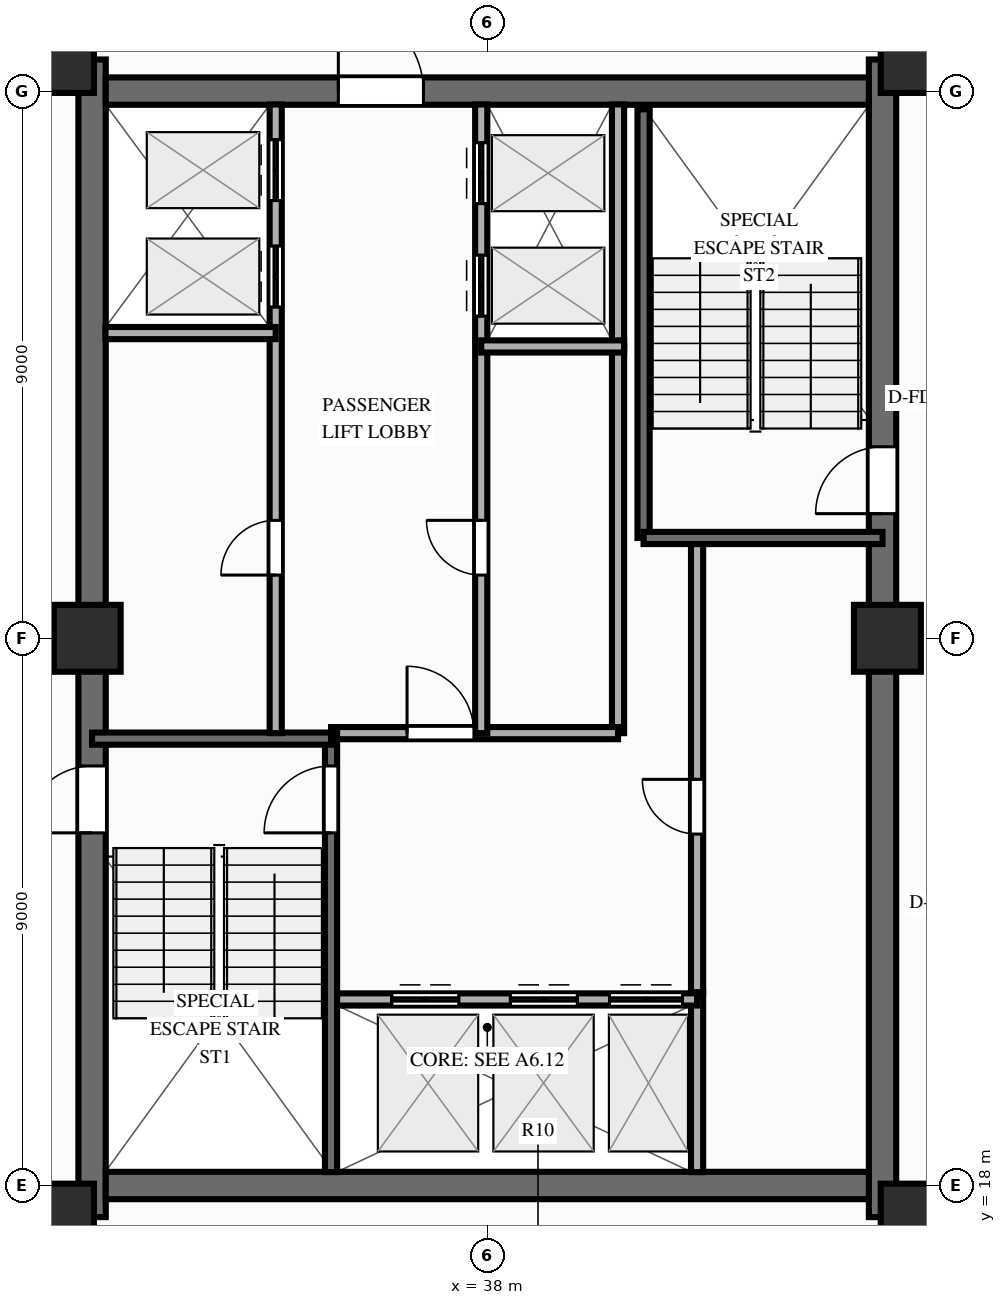
"""IFC4 building model, lengths in metres.
Left out: names, types, materials, properties, quantities, classifications, styles, units other than length and angle.
Written with IfcOpenShell. Run it as: python <this file> out.ifc"""

import sys

from ifc_helpers import new_model, si_unit, direction, frame, frame_2d, origin, origin_2d, place, context, subcontext, project, spatial, rectangle, extrude, source, transform, mapped, element, fill, save


model = new_model("IFC4")
c1 = context("Model", 3, precision=1e-05, world=origin(), true_north=direction((0.0, 1.0)))
c2 = subcontext(c1, "Body", "Model", "MODEL_VIEW")
j1 = project(units=[si_unit("LENGTHUNIT", "METRE"), si_unit("PLANEANGLEUNIT", "RADIAN")], contexts=[c1])
p1 = place(None, origin())
s1 = spatial("IfcSite", under=j1, at=p1, CompositionType="ELEMENT")
p2 = place(p1, origin())
s2 = spatial("IfcBuilding", under=s1, at=p2, CompositionType="ELEMENT")
p3 = place(p2, frame((0.0, 0.0, 192.7)))
s3 = spatial("IfcBuildingStorey", under=s2, at=p3, CompositionType="ELEMENT", Elevation=192.7)
p4 = place(p3, frame((31.5, 17.48, 0.0), z_axis=(0.0, 0.0, 1.0), x_axis=(0.0, 1.0, 0.0)))
e1 = element("IfcWall", 1, at=p4, inside=s3, PredefinedType="SHEAR", context=c2, shape_type="SweptSolid", body=[
    extrude(rectangle(XDim=19.04, YDim=0.45, at=frame_2d((9.52, 0.0))), origin(), (0.0, 0.0, 1.0), 3.9),
])
p5 = place(p4, frame((6.32, 0.0, 0.0)))
e2 = element("IfcOpeningElement", 2, at=p5, cuts=e1, PredefinedType="OPENING", context=c2, shape_type="SweptSolid", body=[
    extrude(rectangle(XDim=1.1, YDim=2.15, at=frame_2d((0.55, 1.075))), frame((0.0, 0.237, 0.0), z_axis=(0.0, -1.0, 0.0), x_axis=(1.0, 0.0, 0.0)), (0.0, 0.0, 1.0), 0.474),
])
p6 = place(p3, frame((44.5, 17.48, 0.0), z_axis=(0.0, 0.0, 1.0), x_axis=(0.0, 1.0, 0.0)))
e3 = element("IfcWall", 3, at=p6, inside=s3, PredefinedType="SHEAR", context=c2, shape_type="SweptSolid", body=[
    extrude(rectangle(XDim=19.04, YDim=0.45, at=frame_2d((9.52, 0.0))), origin(), (0.0, 0.0, 1.0), 3.9),
])
p7 = place(p6, frame((12.67, 0.0, 0.0), z_axis=(0.0, 0.0, 1.0), x_axis=(-1.0, 0.0, 0.0)))
e4 = element("IfcOpeningElement", 4, at=p7, cuts=e3, PredefinedType="OPENING", context=c2, shape_type="SweptSolid", body=[
    extrude(rectangle(XDim=1.1, YDim=2.15, at=frame_2d((0.55, 1.075))), frame((0.0, 0.237, 0.0), z_axis=(0.0, -1.0, 0.0), x_axis=(1.0, 0.0, 0.0)), (0.0, 0.0, 1.0), 0.474),
])
p8 = place(p3, frame((31.725, 18.0, 0.0), z_axis=(0.0, 0.0, 1.0), x_axis=(1.0, 0.0, 0.0)))
e5 = element("IfcWall", 5, at=p8, inside=s3, PredefinedType="SHEAR", context=c2, shape_type="SweptSolid", body=[
    extrude(rectangle(XDim=12.55, YDim=0.45, at=frame_2d((6.275, 0.0))), origin(), (0.0, 0.0, 1.0), 3.9),
])
p9 = place(p3, frame((31.725, 36.0, 0.0), z_axis=(0.0, 0.0, 1.0), x_axis=(1.0, 0.0, 0.0)))
e6 = element("IfcWall", 6, at=p9, inside=s3, PredefinedType="SHEAR", context=c2, shape_type="SweptSolid", body=[
    extrude(rectangle(XDim=12.55, YDim=0.45, at=frame_2d((6.275, 0.0))), origin(), (0.0, 0.0, 1.0), 3.9),
])
p10 = place(p9, frame((5.225, 0.0, 0.0), z_axis=(0.0, 0.0, 1.0), x_axis=(-1.0, 0.0, 0.0)))
e7 = element("IfcOpeningElement", 7, at=p10, cuts=e6, PredefinedType="OPENING", context=c2, shape_type="SweptSolid", body=[
    extrude(rectangle(XDim=1.4, YDim=2.15, at=frame_2d((0.7, 1.075))), frame((0.0, 0.237, 0.0), z_axis=(0.0, -1.0, 0.0), x_axis=(1.0, 0.0, 0.0)), (0.0, 0.0, 1.0), 0.474),
])
m1 = source(origin(), c2, "Body", "SweptSolid", [
    extrude(rectangle(XDim=1.1, YDim=1.1, at=origin_2d()), origin(), (0.0, 0.0, 1.0), 3.9),
])
for number, where, z_axis, x_axis in (
    (8, (30.98, 17.48, 0.0), (0.0, 0.0, 1.0), (1.0, 0.0, 0.0)),
    (9, (45.02, 17.48, 0.0), (0.0, 0.0, 1.0), (1.0, 0.0, 0.0)),
    (10, (30.98, 36.52, 0.0), (0.0, 0.0, 1.0), (1.0, 0.0, 0.0)),
    (11, (45.02, 36.52, 0.0), (0.0, 0.0, 1.0), (1.0, 0.0, 0.0)),
    (12, (31.42, 27.0, 0.0), (0.0, 0.0, 1.0), (1.0, 0.0, 0.0)),
    (13, (44.58, 27.0, 0.0), (0.0, 0.0, 1.0), (1.0, 0.0, 0.0)),
):
    element("IfcColumn", number, at=place(p3, frame(where, z_axis=z_axis, x_axis=x_axis)), inside=s3, PredefinedType="COLUMN", context=c2, shape_type="MappedRepresentation", body=[
        mapped(m1, transform((0.0, 0.0, 0.0), scale=1.0)),
    ])
p11 = place(p3, frame((41.45, 18.22, 0.0), z_axis=(0.0, 0.0, 1.0), x_axis=(0.0, 1.0, 0.0)))
e14 = element("IfcWall", 14, at=p11, inside=s3, PredefinedType="PARTITIONING", context=c2, shape_type="SweptSolid", body=[
    extrude(rectangle(XDim=2.96, YDim=0.2, at=frame_2d((1.48, 0.0))), origin(), (0.0, 0.0, 1.0), 3.56),
])
p12 = place(p3, frame((41.45, 21.18, 0.0), z_axis=(0.0, 0.0, 1.0), x_axis=(0.0, 1.0, 0.0)))
e15 = element("IfcWall", 15, at=p12, inside=s3, PredefinedType="PARTITIONING", context=c2, shape_type="SweptSolid", body=[
    extrude(rectangle(XDim=7.42, YDim=0.2, at=frame_2d((3.71, 0.0))), origin(), (0.0, 0.0, 1.0), 3.56),
])
p13 = place(p12, frame((2.6, 0.0, 0.0)))
e16 = element("IfcOpeningElement", 16, at=p13, cuts=e15, PredefinedType="OPENING", context=c2, shape_type="SweptSolid", body=[
    extrude(rectangle(XDim=0.9, YDim=2.1, at=frame_2d((0.45, 1.05))), frame((0.0, 0.112, 0.0), z_axis=(0.0, -1.0, 0.0), x_axis=(1.0, 0.0, 0.0)), (0.0, 0.0, 1.0), 0.224),
])
p14 = place(p3, frame((40.15, 25.44, 0.0), z_axis=(0.0, 0.0, 1.0), x_axis=(0.0, 1.0, 0.0)))
e17 = element("IfcWall", 17, at=p14, inside=s3, PredefinedType="PARTITIONING", context=c2, shape_type="SweptSolid", body=[
    extrude(rectangle(XDim=6.36, YDim=0.2, at=frame_2d((3.18, 0.0))), origin(), (0.0, 0.0, 1.0), 3.56),
])
p15 = place(p3, frame((40.15, 31.8, 0.0), z_axis=(0.0, 0.0, 1.0), x_axis=(0.0, 1.0, 0.0)))
e18 = element("IfcWall", 18, at=p15, inside=s3, PredefinedType="PARTITIONING", context=c2, shape_type="SweptSolid", body=[
    extrude(rectangle(XDim=3.98, YDim=0.2, at=frame_2d((1.99, 0.0))), origin(), (0.0, 0.0, 1.0), 3.56),
])
p16 = place(p3, frame((35.43, 21.06, 0.0), z_axis=(0.0, 0.0, 1.0), x_axis=(1.0, 0.0, 0.0)))
e19 = element("IfcWall", 19, at=p16, inside=s3, PredefinedType="PARTITIONING", context=c2, shape_type="SweptSolid", body=[
    extrude(rectangle(XDim=6.02, YDim=0.2, at=frame_2d((3.01, 0.0))), origin(), (0.0, 0.0, 1.0), 3.56),
])
p17 = place(p16, frame((1.0, 0.0, 0.0)))
e20 = element("IfcOpeningElement", 20, at=p17, cuts=e19, PredefinedType="OPENING", context=c2, shape_type="SweptSolid", body=[
    extrude(rectangle(XDim=1.1, YDim=2.15, at=frame_2d((0.55, 1.075))), frame((0.0, 0.112, 0.0), z_axis=(0.0, -1.0, 0.0), x_axis=(1.0, 0.0, 0.0)), (0.0, 0.0, 1.0), 0.224),
])
p18 = place(p16, frame((2.95, 0.0, 0.0)))
e21 = element("IfcOpeningElement", 21, at=p18, cuts=e19, PredefinedType="OPENING", context=c2, shape_type="SweptSolid", body=[
    extrude(rectangle(XDim=1.1, YDim=2.15, at=frame_2d((0.55, 1.075))), frame((0.0, 0.112, 0.0), z_axis=(0.0, -1.0, 0.0), x_axis=(1.0, 0.0, 0.0)), (0.0, 0.0, 1.0), 0.224),
])
p19 = place(p16, frame((4.58, 0.0, 0.0)))
e22 = element("IfcOpeningElement", 22, at=p19, cuts=e19, PredefinedType="OPENING", context=c2, shape_type="SweptSolid", body=[
    extrude(rectangle(XDim=1.2, YDim=2.15, at=frame_2d((0.6, 1.075))), frame((0.0, 0.112, 0.0), z_axis=(0.0, -1.0, 0.0), x_axis=(1.0, 0.0, 0.0)), (0.0, 0.0, 1.0), 0.224),
])
p20 = place(p3, frame((35.43, 25.44, 0.0), z_axis=(0.0, 0.0, 1.0), x_axis=(1.0, 0.0, 0.0)))
e23 = element("IfcWall", 23, at=p20, inside=s3, PredefinedType="PARTITIONING", context=c2, shape_type="SweptSolid", body=[
    extrude(rectangle(XDim=4.72, YDim=0.2, at=frame_2d((2.36, 0.0))), origin(), (0.0, 0.0, 1.0), 3.56),
])
p21 = place(p20, frame((1.25, 0.0, 0.0)))
e24 = element("IfcOpeningElement", 24, at=p21, cuts=e23, PredefinedType="OPENING", context=c2, shape_type="SweptSolid", body=[
    extrude(rectangle(XDim=1.1, YDim=2.15, at=frame_2d((0.55, 1.075))), frame((0.0, 0.112, 0.0), z_axis=(0.0, -1.0, 0.0), x_axis=(1.0, 0.0, 0.0)), (0.0, 0.0, 1.0), 0.224),
])
p22 = place(p3, frame((35.43, 18.22, 0.0), z_axis=(0.0, 0.0, 1.0), x_axis=(0.0, 1.0, 0.0)))
e25 = element("IfcWall", 25, at=p22, inside=s3, PredefinedType="SOLIDWALL", context=c2, shape_type="SweptSolid", body=[
    extrude(rectangle(XDim=7.22, YDim=0.2, at=frame_2d((3.61, 0.0))), origin(), (0.0, 0.0, 1.0), 3.69),
])
p23 = place(p22, frame((6.68, 0.0, 0.0), z_axis=(0.0, 0.0, 1.0), x_axis=(-1.0, 0.0, 0.0)))
e26 = element("IfcOpeningElement", 26, at=p23, cuts=e25, PredefinedType="OPENING", context=c2, shape_type="SweptSolid", body=[
    extrude(rectangle(XDim=1.1, YDim=2.15, at=frame_2d((0.55, 1.075))), frame((0.0, 0.112, 0.0), z_axis=(0.0, -1.0, 0.0), x_axis=(1.0, 0.0, 0.0)), (0.0, 0.0, 1.0), 0.224),
])
p24 = place(p3, frame((31.5, 25.35, 0.0), z_axis=(0.0, 0.0, 1.0), x_axis=(1.0, 0.0, 0.0)))
e27 = element("IfcWall", 27, at=p24, inside=s3, PredefinedType="SOLIDWALL", context=c2, shape_type="SweptSolid", body=[
    extrude(rectangle(XDim=3.93, YDim=0.2, at=frame_2d((1.965, 0.0))), origin(), (0.0, 0.0, 1.0), 3.69),
])
p25 = place(p3, frame((40.57, 28.65, 0.0), z_axis=(0.0, 0.0, 1.0), x_axis=(0.0, 1.0, 0.0)))
e28 = element("IfcWall", 28, at=p25, inside=s3, PredefinedType="SOLIDWALL", context=c2, shape_type="SweptSolid", body=[
    extrude(rectangle(XDim=7.05, YDim=0.2, at=frame_2d((3.525, 0.0))), origin(), (0.0, 0.0, 1.0), 3.69),
])
p26 = place(p3, frame((40.57, 28.65, 0.0), z_axis=(0.0, 0.0, 1.0), x_axis=(1.0, 0.0, 0.0)))
e29 = element("IfcWall", 29, at=p26, inside=s3, PredefinedType="SOLIDWALL", context=c2, shape_type="SweptSolid", body=[
    extrude(rectangle(XDim=3.93, YDim=0.2, at=frame_2d((1.965, 0.0))), origin(), (0.0, 0.0, 1.0), 3.69),
])
p27 = place(p3, frame((34.52, 25.44, 0.0), z_axis=(0.0, 0.0, 1.0), x_axis=(0.0, 1.0, 0.0)))
e30 = element("IfcWall", 30, at=p27, inside=s3, PredefinedType="PARTITIONING", context=c2, shape_type="SweptSolid", body=[
    extrude(rectangle(XDim=10.34, YDim=0.2, at=frame_2d((5.17, 0.0))), origin(), (0.0, 0.0, 1.0), 3.56),
])
p28 = place(p27, frame((2.6, 0.0, 0.0)))
e31 = element("IfcOpeningElement", 31, at=p28, cuts=e30, PredefinedType="OPENING", context=c2, shape_type="SweptSolid", body=[
    extrude(rectangle(XDim=0.9, YDim=2.1, at=frame_2d((0.45, 1.05))), frame((0.0, 0.112, 0.0), z_axis=(0.0, -1.0, 0.0), x_axis=(1.0, 0.0, 0.0)), (0.0, 0.0, 1.0), 0.224),
])
p29 = place(p27, frame((7.01, 0.0, 0.0)))
e32 = element("IfcOpeningElement", 32, at=p29, cuts=e30, PredefinedType="OPENING", context=c2, shape_type="SweptSolid", body=[
    extrude(rectangle(XDim=1.0, YDim=2.15, at=frame_2d((0.5, 1.075))), frame((0.0, 0.112, 0.0), z_axis=(0.0, -1.0, 0.0), x_axis=(1.0, 0.0, 0.0)), (0.0, 0.0, 1.0), 0.224),
])
p30 = place(p27, frame((8.76, 0.0, 0.0)))
e33 = element("IfcOpeningElement", 33, at=p30, cuts=e30, PredefinedType="OPENING", context=c2, shape_type="SweptSolid", body=[
    extrude(rectangle(XDim=1.0, YDim=2.15, at=frame_2d((0.5, 1.075))), frame((0.0, 0.112, 0.0), z_axis=(0.0, -1.0, 0.0), x_axis=(1.0, 0.0, 0.0)), (0.0, 0.0, 1.0), 0.224),
])
p31 = place(p3, frame((31.72, 32.02, 0.0), z_axis=(0.0, 0.0, 1.0), x_axis=(1.0, 0.0, 0.0)))
e34 = element("IfcWall", 34, at=p31, inside=s3, PredefinedType="PARTITIONING", context=c2, shape_type="SweptSolid", body=[
    extrude(rectangle(XDim=2.8, YDim=0.2, at=frame_2d((1.4, 0.0))), origin(), (0.0, 0.0, 1.0), 3.56),
])
p32 = place(p3, frame((37.9, 25.44, 0.0), z_axis=(0.0, 0.0, 1.0), x_axis=(0.0, 1.0, 0.0)))
e35 = element("IfcWall", 35, at=p32, inside=s3, PredefinedType="PARTITIONING", context=c2, shape_type="SweptSolid", body=[
    extrude(rectangle(XDim=10.34, YDim=0.2, at=frame_2d((5.17, 0.0))), origin(), (0.0, 0.0, 1.0), 3.56),
])
p33 = place(p32, frame((2.6, 0.0, 0.0)))
e36 = element("IfcOpeningElement", 36, at=p33, cuts=e35, PredefinedType="OPENING", context=c2, shape_type="SweptSolid", body=[
    extrude(rectangle(XDim=0.9, YDim=2.1, at=frame_2d((0.45, 1.05))), frame((0.0, 0.112, 0.0), z_axis=(0.0, -1.0, 0.0), x_axis=(1.0, 0.0, 0.0)), (0.0, 0.0, 1.0), 0.224),
])
p34 = place(p32, frame((6.86, 0.0, 0.0)))
e37 = element("IfcOpeningElement", 37, at=p34, cuts=e35, PredefinedType="OPENING", context=c2, shape_type="SweptSolid", body=[
    extrude(rectangle(XDim=1.0, YDim=2.15, at=frame_2d((0.5, 1.075))), frame((0.0, 0.112, 0.0), z_axis=(0.0, -1.0, 0.0), x_axis=(1.0, 0.0, 0.0)), (0.0, 0.0, 1.0), 0.224),
])
p35 = place(p32, frame((8.71, 0.0, 0.0)))
e38 = element("IfcOpeningElement", 38, at=p35, cuts=e35, PredefinedType="OPENING", context=c2, shape_type="SweptSolid", body=[
    extrude(rectangle(XDim=1.0, YDim=2.15, at=frame_2d((0.5, 1.075))), frame((0.0, 0.112, 0.0), z_axis=(0.0, -1.0, 0.0), x_axis=(1.0, 0.0, 0.0)), (0.0, 0.0, 1.0), 0.224),
])
p36 = place(p3, frame((37.9, 31.8, 0.0), z_axis=(0.0, 0.0, 1.0), x_axis=(1.0, 0.0, 0.0)))
e39 = element("IfcWall", 39, at=p36, inside=s3, PredefinedType="PARTITIONING", context=c2, shape_type="SweptSolid", body=[
    extrude(rectangle(XDim=2.35, YDim=0.2, at=frame_2d((1.175, 0.0))), origin(), (0.0, 0.0, 1.0), 3.56),
])
m2 = source(origin(), c2, "Body", "SweptSolid", [
    extrude(rectangle(XDim=1.1, YDim=2.15, at=frame_2d((0.55, 1.075))), frame((0.0, 0.025, 0.0), z_axis=(0.0, -1.0, 0.0), x_axis=(1.0, 0.0, 0.0)), (0.0, 0.0, 1.0), 0.05),
])
p37 = place(p5, origin())
e40 = element("IfcDoor", 40, at=p37, inside=s3, OperationType="SINGLE_SWING_LEFT", PredefinedType="DOOR", context=c2, shape_type="MappedRepresentation", body=[
    mapped(m2, transform((0.0, 0.0, 0.0), scale=1.0)),
])
fill(e2, e40)
p38 = place(p7, origin())
e41 = element("IfcDoor", 41, at=p38, inside=s3, OperationType="SINGLE_SWING_RIGHT", PredefinedType="DOOR", context=c2, shape_type="MappedRepresentation", body=[
    mapped(m2, transform((0.0, 0.0, 0.0), scale=1.0)),
])
fill(e4, e41)
m3 = source(origin(), c2, "Body", "SweptSolid", [
    extrude(rectangle(XDim=1.4, YDim=2.15, at=frame_2d((0.7, 1.075))), frame((0.0, 0.025, 0.0), z_axis=(0.0, -1.0, 0.0), x_axis=(1.0, 0.0, 0.0)), (0.0, 0.0, 1.0), 0.05),
])
p39 = place(p10, origin())
e42 = element("IfcDoor", 42, at=p39, inside=s3, OperationType="SINGLE_SWING_RIGHT", PredefinedType="DOOR", context=c2, shape_type="MappedRepresentation", body=[
    mapped(m3, transform((0.0, 0.0, 0.0), scale=1.0)),
])
fill(e7, e42)
m4 = source(origin(), c2, "Body", "SweptSolid", [
    extrude(rectangle(XDim=0.9, YDim=2.1, at=frame_2d((0.45, 1.05))), frame((0.0, 0.025, 0.0), z_axis=(0.0, -1.0, 0.0), x_axis=(1.0, 0.0, 0.0)), (0.0, 0.0, 1.0), 0.05),
])
p40 = place(p13, origin())
e43 = element("IfcDoor", 43, at=p40, inside=s3, OperationType="SINGLE_SWING_RIGHT", PredefinedType="DOOR", context=c2, shape_type="MappedRepresentation", body=[
    mapped(m4, transform((0.0, 0.0, 0.0), scale=1.0)),
])
fill(e16, e43)
p41 = place(p17, origin())
e44 = element("IfcDoor", 44, at=p41, inside=s3, OperationType="DOUBLE_DOOR_SLIDING", PredefinedType="DOOR", context=c2, shape_type="MappedRepresentation", body=[
    mapped(m2, transform((0.0, 0.0, 0.0), scale=1.0)),
])
fill(e20, e44)
p42 = place(p18, origin())
e45 = element("IfcDoor", 45, at=p42, inside=s3, OperationType="DOUBLE_DOOR_SLIDING", PredefinedType="DOOR", context=c2, shape_type="MappedRepresentation", body=[
    mapped(m2, transform((0.0, 0.0, 0.0), scale=1.0)),
])
fill(e21, e45)
m5 = source(origin(), c2, "Body", "SweptSolid", [
    extrude(rectangle(XDim=1.2, YDim=2.15, at=frame_2d((0.6, 1.075))), frame((0.0, 0.025, 0.0), z_axis=(0.0, -1.0, 0.0), x_axis=(1.0, 0.0, 0.0)), (0.0, 0.0, 1.0), 0.05),
])
p43 = place(p19, origin())
e46 = element("IfcDoor", 46, at=p43, inside=s3, OperationType="DOUBLE_DOOR_SLIDING", PredefinedType="DOOR", context=c2, shape_type="MappedRepresentation", body=[
    mapped(m5, transform((0.0, 0.0, 0.0), scale=1.0)),
])
fill(e22, e46)
p44 = place(p21, origin())
e47 = element("IfcDoor", 47, at=p44, inside=s3, OperationType="SINGLE_SWING_LEFT", PredefinedType="DOOR", context=c2, shape_type="MappedRepresentation", body=[
    mapped(m2, transform((0.0, 0.0, 0.0), scale=1.0)),
])
fill(e24, e47)
p45 = place(p23, origin())
e48 = element("IfcDoor", 48, at=p45, inside=s3, OperationType="SINGLE_SWING_RIGHT", PredefinedType="DOOR", context=c2, shape_type="MappedRepresentation", body=[
    mapped(m2, transform((0.0, 0.0, 0.0), scale=1.0)),
])
fill(e26, e48)
p46 = place(p28, origin())
e49 = element("IfcDoor", 49, at=p46, inside=s3, OperationType="SINGLE_SWING_LEFT", PredefinedType="DOOR", context=c2, shape_type="MappedRepresentation", body=[
    mapped(m4, transform((0.0, 0.0, 0.0), scale=1.0)),
])
fill(e31, e49)
m6 = source(origin(), c2, "Body", "SweptSolid", [
    extrude(rectangle(XDim=1.0, YDim=2.15, at=frame_2d((0.5, 1.075))), frame((0.0, 0.025, 0.0), z_axis=(0.0, -1.0, 0.0), x_axis=(1.0, 0.0, 0.0)), (0.0, 0.0, 1.0), 0.05),
])
p47 = place(p29, origin())
e50 = element("IfcDoor", 50, at=p47, inside=s3, OperationType="DOUBLE_DOOR_SLIDING", PredefinedType="DOOR", context=c2, shape_type="MappedRepresentation", body=[
    mapped(m6, transform((0.0, 0.0, 0.0), scale=1.0)),
])
fill(e32, e50)
p48 = place(p30, origin())
e51 = element("IfcDoor", 51, at=p48, inside=s3, OperationType="DOUBLE_DOOR_SLIDING", PredefinedType="DOOR", context=c2, shape_type="MappedRepresentation", body=[
    mapped(m6, transform((0.0, 0.0, 0.0), scale=1.0)),
])
fill(e33, e51)
p49 = place(p33, origin())
e52 = element("IfcDoor", 52, at=p49, inside=s3, OperationType="SINGLE_SWING_RIGHT", PredefinedType="DOOR", context=c2, shape_type="MappedRepresentation", body=[
    mapped(m4, transform((0.0, 0.0, 0.0), scale=1.0)),
])
fill(e36, e52)
p50 = place(p34, origin())
e53 = element("IfcDoor", 53, at=p50, inside=s3, OperationType="DOUBLE_DOOR_SLIDING", PredefinedType="DOOR", context=c2, shape_type="MappedRepresentation", body=[
    mapped(m6, transform((0.0, 0.0, 0.0), scale=1.0)),
])
fill(e37, e53)
p51 = place(p35, origin())
e54 = element("IfcDoor", 54, at=p51, inside=s3, OperationType="DOUBLE_DOOR_SLIDING", PredefinedType="DOOR", context=c2, shape_type="MappedRepresentation", body=[
    mapped(m6, transform((0.0, 0.0, 0.0), scale=1.0)),
])
fill(e38, e54)
save(model, sys.argv[1])
